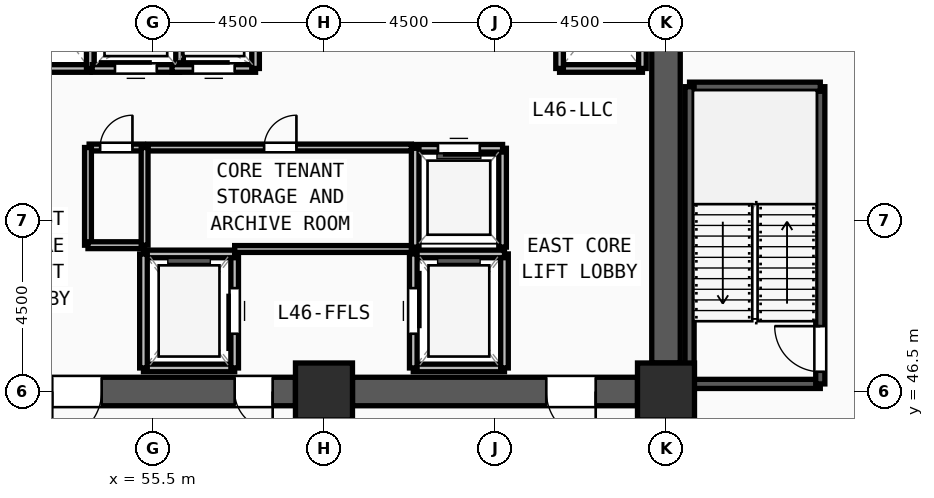
"""IFC4 building model, lengths in metres.
Left out: names, types, materials, properties, quantities, classifications, styles, units other than length and angle.
Written with IfcOpenShell. Run it as: python <this file> out.ifc"""

import sys

from ifc_helpers import new_model, si_unit, direction, frame, frame_2d, origin, origin_2d, place, context, subcontext, project, spatial, rectangle, extrude, source, transform, mapped, element, fill, save


model = new_model("IFC4")
c1 = context("Model", 3, precision=1e-05, world=origin(), true_north=direction((0.0, 1.0)))
c2 = subcontext(c1, "Body", "Model", "MODEL_VIEW")
j1 = project(units=[si_unit("LENGTHUNIT", "METRE"), si_unit("PLANEANGLEUNIT", "RADIAN")], contexts=[c1])
p1 = place(None, origin())
s1 = spatial("IfcSite", under=j1, at=p1, CompositionType="ELEMENT")
p2 = place(p1, origin())
s2 = spatial("IfcBuilding", under=s1, at=p2, CompositionType="ELEMENT")
p3 = place(p2, frame((0.0, 0.0, 177.75)))
s3 = spatial("IfcBuildingStorey", under=s2, at=p3, CompositionType="ELEMENT", Elevation=177.75)
m1 = source(origin(), c2, "Body", "SweptSolid", [
    extrude(rectangle(XDim=1.5, YDim=1.5, at=origin_2d()), origin(), (0.0, 0.0, 1.0), 3.75),
])
for number, where, z_axis, x_axis in (
    (1, (60.0, 46.5, 0.0), (0.0, 0.0, 1.0), (1.0, 0.0, 0.0)),
    (2, (69.0, 46.5, 0.0), (0.0, 0.0, 1.0), (1.0, 0.0, 0.0)),
):
    element("IfcColumn", number, at=place(p3, frame(where, z_axis=z_axis, x_axis=x_axis)), inside=s3, PredefinedType="COLUMN", context=c2, shape_type="MappedRepresentation", body=[
        mapped(m1, transform((0.0, 0.0, 0.0), x_axis=(1.0, 0.0, 0.0), y_axis=(0.0, 1.0, 0.0), z_axis=(0.0, 0.0, 1.0), scale=1.0)),
    ])
p4 = place(p3, frame((69.0, 60.75, 0.0), z_axis=(0.0, 0.0, 1.0), x_axis=(0.0, -1.0, 0.0)))
e3 = element("IfcWall", 3, at=p4, inside=s3, PredefinedType="SHEAR", context=c2, shape_type="SweptSolid", body=[
    extrude(rectangle(XDim=13.5, YDim=0.75, at=frame_2d((6.75, 0.0))), origin(), (0.0, 0.0, 1.0), 3.57),
])
m2 = source(origin(), c2, "Body", "SweptSolid", [
    extrude(rectangle(XDim=1.2, YDim=2.2, at=frame_2d((0.6, 1.1))), frame((0.0, 0.385, 0.0), z_axis=(0.0, -1.0, 0.0), x_axis=(1.0, 0.0, 0.0)), (0.0, 0.0, 1.0), 0.77),
])
p5 = place(p4, frame((1.2, 0.0, 0.0)))
e4 = element("IfcOpeningElement", 4, at=p5, cuts=e3, PredefinedType="OPENING", context=c2, shape_type="MappedRepresentation", body=[
    mapped(m2, transform((0.0, 0.0, 0.0), x_axis=(1.0, 0.0, 0.0), y_axis=(0.0, 1.0, 0.0), z_axis=(0.0, 0.0, 1.0), scale=1.0)),
])
p6 = place(p3, frame((68.25, 46.5, 0.0), z_axis=(0.0, 0.0, 1.0), x_axis=(-1.0, 0.0, 0.0)))
e5 = element("IfcWall", 5, at=p6, inside=s3, PredefinedType="SHEAR", context=c2, shape_type="SweptSolid", body=[
    extrude(rectangle(XDim=7.5, YDim=0.75, at=frame_2d((3.75, 0.0))), origin(), (0.0, 0.0, 1.0), 3.57),
])
m3 = source(origin(), c2, "Body", "SweptSolid", [
    extrude(rectangle(XDim=1.3, YDim=2.2, at=frame_2d((0.65, 1.1))), frame((0.0, 0.385, 0.0), z_axis=(0.0, -1.0, 0.0), x_axis=(1.0, 0.0, 0.0)), (0.0, 0.0, 1.0), 0.77),
])
p7 = place(p6, frame((1.1, 0.0, 0.0)))
e6 = element("IfcOpeningElement", 6, at=p7, cuts=e5, PredefinedType="OPENING", context=c2, shape_type="MappedRepresentation", body=[
    mapped(m3, transform((0.0, 0.0, 0.0), x_axis=(1.0, 0.0, 0.0), y_axis=(0.0, 1.0, 0.0), z_axis=(0.0, 0.0, 1.0), scale=1.0)),
])
p8 = place(p3, frame((59.25, 46.5, 0.0), z_axis=(0.0, 0.0, 1.0), x_axis=(-1.0, 0.0, 0.0)))
e7 = element("IfcWall", 7, at=p8, inside=s3, PredefinedType="SHEAR", context=c2, shape_type="SweptSolid", body=[
    extrude(rectangle(XDim=7.5, YDim=0.75, at=frame_2d((3.75, 0.0))), origin(), (0.0, 0.0, 1.0), 3.57),
])
p9 = place(p8, frame((5.1, 0.0, 0.0)))
e8 = element("IfcOpeningElement", 8, at=p9, cuts=e7, PredefinedType="OPENING", context=c2, shape_type="MappedRepresentation", body=[
    mapped(m3, transform((0.0, 0.0, 0.0), x_axis=(1.0, 0.0, 0.0), y_axis=(0.0, 1.0, 0.0), z_axis=(0.0, 0.0, 1.0), scale=1.0)),
])
m4 = source(origin(), c2, "Body", "SweptSolid", [
    extrude(rectangle(XDim=1.0, YDim=2.2, at=frame_2d((0.5, 1.1))), frame((0.0, 0.385, 0.0), z_axis=(0.0, -1.0, 0.0), x_axis=(1.0, 0.0, 0.0)), (0.0, 0.0, 1.0), 0.77),
])
p10 = place(p8, frame((0.6, 0.0, 0.0)))
e9 = element("IfcOpeningElement", 9, at=p10, cuts=e7, PredefinedType="OPENING", context=c2, shape_type="MappedRepresentation", body=[
    mapped(m4, transform((0.0, 0.0, 0.0), x_axis=(1.0, 0.0, 0.0), y_axis=(0.0, 1.0, 0.0), z_axis=(0.0, 0.0, 1.0), scale=1.0)),
])
p11 = place(p3, frame((69.62, 46.7, 0.0), z_axis=(0.0, 0.0, 1.0), x_axis=(1.0, 0.0, 0.0)))
e10 = element("IfcWall", 10, at=p11, inside=s3, PredefinedType="SOLIDWALL", context=c2, shape_type="SweptSolid", body=[
    extrude(rectangle(XDim=3.44, YDim=0.24, at=frame_2d((1.72, 0.0))), origin(), (0.0, 0.0, 1.0), 3.57),
])
p12 = place(p3, frame((73.06, 46.7, 0.0), z_axis=(0.0, 0.0, 1.0), x_axis=(0.0, 1.0, 0.0)))
e11 = element("IfcWall", 11, at=p12, inside=s3, PredefinedType="SOLIDWALL", context=c2, shape_type="SweptSolid", body=[
    extrude(rectangle(XDim=7.82, YDim=0.24, at=frame_2d((3.91, 0.0))), origin(), (0.0, 0.0, 1.0), 3.57),
])
m5 = source(origin(), c2, "Body", "SweptSolid", [
    extrude(rectangle(XDim=1.2, YDim=2.2, at=frame_2d((0.6, 1.1))), frame((0.0, 0.13, 0.0), z_axis=(0.0, -1.0, 0.0), x_axis=(1.0, 0.0, 0.0)), (0.0, 0.0, 1.0), 0.26),
])
p13 = place(p12, frame((0.32, 0.0, 0.0)))
e12 = element("IfcOpeningElement", 12, at=p13, cuts=e11, PredefinedType="OPENING", context=c2, shape_type="MappedRepresentation", body=[
    mapped(m5, transform((0.0, 0.0, 0.0), x_axis=(1.0, 0.0, 0.0), y_axis=(0.0, 1.0, 0.0), z_axis=(0.0, 0.0, 1.0), scale=1.0)),
])
p14 = place(p3, frame((73.06, 54.52, 0.0), z_axis=(0.0, 0.0, 1.0), x_axis=(-1.0, 0.0, 0.0)))
e13 = element("IfcWall", 13, at=p14, inside=s3, PredefinedType="SOLIDWALL", context=c2, shape_type="SweptSolid", body=[
    extrude(rectangle(XDim=3.44, YDim=0.24, at=frame_2d((1.72, 0.0))), origin(), (0.0, 0.0, 1.0), 3.57),
])
p15 = place(p3, frame((69.62, 54.52, 0.0), z_axis=(0.0, 0.0, 1.0), x_axis=(0.0, -1.0, 0.0)))
e14 = element("IfcWall", 14, at=p15, inside=s3, PredefinedType="SOLIDWALL", context=c2, shape_type="SweptSolid", body=[
    extrude(rectangle(XDim=7.82, YDim=0.24, at=frame_2d((3.91, 0.0))), origin(), (0.0, 0.0, 1.0), 3.57),
])
p16 = place(p3, frame((55.25, 47.12, 0.0), z_axis=(0.0, 0.0, 1.0), x_axis=(1.0, 0.0, 0.0)))
e15 = element("IfcWall", 15, at=p16, inside=s3, PredefinedType="SOLIDWALL", context=c2, shape_type="SweptSolid", body=[
    extrude(rectangle(XDim=2.4, YDim=0.2, at=frame_2d((1.2, 0.0))), origin(), (0.0, 0.0, 1.0), 3.57),
])
p17 = place(p3, frame((57.65, 47.12, 0.0), z_axis=(0.0, 0.0, 1.0), x_axis=(0.0, 1.0, 0.0)))
e16 = element("IfcWall", 16, at=p17, inside=s3, PredefinedType="SOLIDWALL", context=c2, shape_type="SweptSolid", body=[
    extrude(rectangle(XDim=3.0, YDim=0.2, at=frame_2d((1.5, 0.0))), origin(), (0.0, 0.0, 1.0), 3.57),
])
m6 = source(origin(), c2, "Body", "SweptSolid", [
    extrude(rectangle(XDim=1.2, YDim=2.3, at=frame_2d((0.6, 1.15))), frame((0.0, 0.11, 0.0), z_axis=(0.0, -1.0, 0.0), x_axis=(1.0, 0.0, 0.0)), (0.0, 0.0, 1.0), 0.22),
])
p18 = place(p17, frame((0.9, 0.0, 0.0)))
e17 = element("IfcOpeningElement", 17, at=p18, cuts=e16, PredefinedType="OPENING", context=c2, shape_type="MappedRepresentation", body=[
    mapped(m6, transform((0.0, 0.0, 0.0), x_axis=(1.0, 0.0, 0.0), y_axis=(0.0, 1.0, 0.0), z_axis=(0.0, 0.0, 1.0), scale=1.0)),
])
p19 = place(p3, frame((57.65, 50.12, 0.0), z_axis=(0.0, 0.0, 1.0), x_axis=(-1.0, 0.0, 0.0)))
e18 = element("IfcWall", 18, at=p19, inside=s3, PredefinedType="SOLIDWALL", context=c2, shape_type="SweptSolid", body=[
    extrude(rectangle(XDim=2.4, YDim=0.2, at=frame_2d((1.2, 0.0))), origin(), (0.0, 0.0, 1.0), 3.57),
])
p20 = place(p3, frame((55.25, 50.12, 0.0), z_axis=(0.0, 0.0, 1.0), x_axis=(0.0, -1.0, 0.0)))
e19 = element("IfcWall", 19, at=p20, inside=s3, PredefinedType="SOLIDWALL", context=c2, shape_type="SweptSolid", body=[
    extrude(rectangle(XDim=3.0, YDim=0.2, at=frame_2d((1.5, 0.0))), origin(), (0.0, 0.0, 1.0), 3.57),
])
p21 = place(p3, frame((62.35, 47.12, 0.0), z_axis=(0.0, 0.0, 1.0), x_axis=(1.0, 0.0, 0.0)))
e20 = element("IfcWall", 20, at=p21, inside=s3, PredefinedType="SOLIDWALL", context=c2, shape_type="SweptSolid", body=[
    extrude(rectangle(XDim=2.4, YDim=0.2, at=frame_2d((1.2, 0.0))), origin(), (0.0, 0.0, 1.0), 3.57),
])
p22 = place(p3, frame((64.75, 47.12, 0.0), z_axis=(0.0, 0.0, 1.0), x_axis=(0.0, 1.0, 0.0)))
e21 = element("IfcWall", 21, at=p22, inside=s3, PredefinedType="SOLIDWALL", context=c2, shape_type="SweptSolid", body=[
    extrude(rectangle(XDim=3.0, YDim=0.2, at=frame_2d((1.5, 0.0))), origin(), (0.0, 0.0, 1.0), 3.57),
])
p23 = place(p3, frame((64.75, 50.12, 0.0), z_axis=(0.0, 0.0, 1.0), x_axis=(-1.0, 0.0, 0.0)))
e22 = element("IfcWall", 22, at=p23, inside=s3, PredefinedType="SOLIDWALL", context=c2, shape_type="SweptSolid", body=[
    extrude(rectangle(XDim=2.4, YDim=0.2, at=frame_2d((1.2, 0.0))), origin(), (0.0, 0.0, 1.0), 3.57),
])
p24 = place(p3, frame((62.35, 50.12, 0.0), z_axis=(0.0, 0.0, 1.0), x_axis=(0.0, -1.0, 0.0)))
e23 = element("IfcWall", 23, at=p24, inside=s3, PredefinedType="SOLIDWALL", context=c2, shape_type="SweptSolid", body=[
    extrude(rectangle(XDim=3.0, YDim=0.2, at=frame_2d((1.5, 0.0))), origin(), (0.0, 0.0, 1.0), 3.57),
])
p25 = place(p24, frame((0.9, 0.0, 0.0)))
e24 = element("IfcOpeningElement", 24, at=p25, cuts=e23, PredefinedType="OPENING", context=c2, shape_type="MappedRepresentation", body=[
    mapped(m6, transform((0.0, 0.0, 0.0), x_axis=(1.0, 0.0, 0.0), y_axis=(0.0, 1.0, 0.0), z_axis=(0.0, 0.0, 1.0), scale=1.0)),
])
p26 = place(p3, frame((51.62, 55.0, 0.0), z_axis=(0.0, 0.0, 1.0), x_axis=(1.0, 0.0, 0.0)))
e25 = element("IfcWall", 25, at=p26, inside=s3, PredefinedType="SOLIDWALL", context=c2, shape_type="SweptSolid", body=[
    extrude(rectangle(XDim=2.23, YDim=0.2, at=frame_2d((1.115, 0.0))), origin(), (0.0, 0.0, 1.0), 3.57),
])
p27 = place(p3, frame((53.85, 55.0, 0.0), z_axis=(0.0, 0.0, 1.0), x_axis=(0.0, 1.0, 0.0)))
e26 = element("IfcWall", 26, at=p27, inside=s3, PredefinedType="SOLIDWALL", context=c2, shape_type="SweptSolid", body=[
    extrude(rectangle(XDim=3.0, YDim=0.2, at=frame_2d((1.5, 0.0))), origin(), (0.0, 0.0, 1.0), 3.57),
])
p28 = place(p3, frame((66.2, 55.0, 0.0), z_axis=(0.0, 0.0, 1.0), x_axis=(1.0, 0.0, 0.0)))
e27 = element("IfcWall", 27, at=p28, inside=s3, PredefinedType="SOLIDWALL", context=c2, shape_type="SweptSolid", body=[
    extrude(rectangle(XDim=2.18, YDim=0.2, at=frame_2d((1.09, 0.0))), origin(), (0.0, 0.0, 1.0), 3.57),
])
for number, where, z_axis, x_axis in (
    (28, (68.38, 55.0, 0.0), (0.0, 0.0, 1.0), (0.0, 1.0, 0.0)),
    (29, (66.2, 57.75, 0.0), (0.0, 0.0, 1.0), (0.0, -1.0, 0.0)),
):
    element("IfcWall", number, at=place(p3, frame(where, z_axis=z_axis, x_axis=x_axis)), inside=s3, PredefinedType="SOLIDWALL", context=c2, shape_type="SweptSolid", body=[
        extrude(rectangle(XDim=2.75, YDim=0.2, at=frame_2d((1.375, 0.0))), origin(), (0.0, 0.0, 1.0), 3.57),
    ])
p29 = place(p3, frame((64.7, 50.3, 0.0), z_axis=(0.0, 0.0, 1.0), x_axis=(0.0, 1.0, 0.0)))
e30 = element("IfcWall", 30, at=p29, inside=s3, PredefinedType="SOLIDWALL", context=c2, shape_type="SweptSolid", body=[
    extrude(rectangle(XDim=2.6, YDim=0.2, at=frame_2d((1.3, 0.0))), origin(), (0.0, 0.0, 1.0), 3.57),
])
p30 = place(p3, frame((64.7, 52.9, 0.0), z_axis=(0.0, 0.0, 1.0), x_axis=(-1.0, 0.0, 0.0)))
e31 = element("IfcWall", 31, at=p30, inside=s3, PredefinedType="SOLIDWALL", context=c2, shape_type="SweptSolid", body=[
    extrude(rectangle(XDim=2.3, YDim=0.2, at=frame_2d((1.15, 0.0))), origin(), (0.0, 0.0, 1.0), 3.57),
])
m7 = source(origin(), c2, "Body", "SweptSolid", [
    extrude(rectangle(XDim=1.1, YDim=2.2, at=frame_2d((0.55, 1.1))), frame((0.0, 0.11, 0.0), z_axis=(0.0, -1.0, 0.0), x_axis=(1.0, 0.0, 0.0)), (0.0, 0.0, 1.0), 0.22),
])
p31 = place(p30, frame((0.6, 0.0, 0.0)))
e32 = element("IfcOpeningElement", 32, at=p31, cuts=e31, PredefinedType="OPENING", context=c2, shape_type="MappedRepresentation", body=[
    mapped(m7, transform((0.0, 0.0, 0.0), x_axis=(1.0, 0.0, 0.0), y_axis=(0.0, 1.0, 0.0), z_axis=(0.0, 0.0, 1.0), scale=1.0)),
])
p32 = place(p3, frame((62.4, 52.9, 0.0), z_axis=(0.0, 0.0, 1.0), x_axis=(0.0, -1.0, 0.0)))
e33 = element("IfcWall", 33, at=p32, inside=s3, PredefinedType="SOLIDWALL", context=c2, shape_type="SweptSolid", body=[
    extrude(rectangle(XDim=2.6, YDim=0.2, at=frame_2d((1.3, 0.0))), origin(), (0.0, 0.0, 1.0), 3.57),
])
p33 = place(p3, frame((53.9, 55.0, 0.0), z_axis=(0.0, 0.0, 1.0), x_axis=(1.0, 0.0, 0.0)))
e34 = element("IfcWall", 34, at=p33, inside=s3, PredefinedType="SOLIDWALL", context=c2, shape_type="SweptSolid", body=[
    extrude(rectangle(XDim=2.3, YDim=0.2, at=frame_2d((1.15, 0.0))), origin(), (0.0, 0.0, 1.0), 3.57),
])
p34 = place(p33, frame((0.6, 0.0, 0.0)))
e35 = element("IfcOpeningElement", 35, at=p34, cuts=e34, PredefinedType="OPENING", context=c2, shape_type="MappedRepresentation", body=[
    mapped(m7, transform((0.0, 0.0, 0.0), x_axis=(1.0, 0.0, 0.0), y_axis=(0.0, 1.0, 0.0), z_axis=(0.0, 0.0, 1.0), scale=1.0)),
])
p35 = place(p3, frame((56.2, 55.0, 0.0), z_axis=(0.0, 0.0, 1.0), x_axis=(0.0, 1.0, 0.0)))
e36 = element("IfcWall", 36, at=p35, inside=s3, PredefinedType="SOLIDWALL", context=c2, shape_type="SweptSolid", body=[
    extrude(rectangle(XDim=2.6, YDim=0.2, at=frame_2d((1.3, 0.0))), origin(), (0.0, 0.0, 1.0), 3.57),
])
p36 = place(p3, frame((56.0, 55.0, 0.0), z_axis=(0.0, 0.0, 1.0), x_axis=(1.0, 0.0, 0.0)))
e37 = element("IfcWall", 37, at=p36, inside=s3, PredefinedType="SOLIDWALL", context=c2, shape_type="SweptSolid", body=[
    extrude(rectangle(XDim=2.2, YDim=0.2, at=frame_2d((1.1, 0.0))), origin(), (0.0, 0.0, 1.0), 3.57),
])
p37 = place(p36, frame((0.55, 0.0, 0.0)))
e38 = element("IfcOpeningElement", 38, at=p37, cuts=e37, PredefinedType="OPENING", context=c2, shape_type="MappedRepresentation", body=[
    mapped(m7, transform((0.0, 0.0, 0.0), x_axis=(1.0, 0.0, 0.0), y_axis=(0.0, 1.0, 0.0), z_axis=(0.0, 0.0, 1.0), scale=1.0)),
])
p38 = place(p3, frame((58.2, 55.0, 0.0), z_axis=(0.0, 0.0, 1.0), x_axis=(0.0, 1.0, 0.0)))
e39 = element("IfcWall", 39, at=p38, inside=s3, PredefinedType="SOLIDWALL", context=c2, shape_type="SweptSolid", body=[
    extrude(rectangle(XDim=2.6, YDim=0.2, at=frame_2d((1.3, 0.0))), origin(), (0.0, 0.0, 1.0), 3.57),
])
p39 = place(p3, frame((55.37, 52.92, 0.0), z_axis=(0.0, 0.0, 1.0), x_axis=(1.0, 0.0, 0.0)))
e40 = element("IfcWall", 40, at=p39, inside=s3, PredefinedType="PARTITIONING", context=c2, shape_type="SweptSolid", body=[
    extrude(rectangle(XDim=6.93, YDim=0.18, at=frame_2d((3.465, 0.0))), origin(), (0.0, 0.0, 1.0), 3.57),
])
m8 = source(origin(), c2, "Body", "SweptSolid", [
    extrude(rectangle(XDim=0.85, YDim=2.1, at=frame_2d((0.425, 1.05))), frame((0.0, 0.1, 0.0), z_axis=(0.0, -1.0, 0.0), x_axis=(1.0, 0.0, 0.0)), (0.0, 0.0, 1.0), 0.2),
])
p40 = place(p39, frame((3.055, 0.0, 0.0)))
e41 = element("IfcOpeningElement", 41, at=p40, cuts=e40, PredefinedType="OPENING", context=c2, shape_type="MappedRepresentation", body=[
    mapped(m8, transform((0.0, 0.0, 0.0), x_axis=(1.0, 0.0, 0.0), y_axis=(0.0, 1.0, 0.0), z_axis=(0.0, 0.0, 1.0), scale=1.0)),
])
p41 = place(p3, frame((53.82, 52.92, 0.0), z_axis=(0.0, 0.0, 1.0), x_axis=(1.0, 0.0, 0.0)))
e42 = element("IfcWall", 42, at=p41, inside=s3, PredefinedType="PARTITIONING", context=c2, shape_type="SweptSolid", body=[
    extrude(rectangle(XDim=1.43, YDim=0.18, at=frame_2d((0.715, 0.0))), origin(), (0.0, 0.0, 1.0), 3.57),
])
p42 = place(p41, frame((0.29, 0.0, 0.0)))
e43 = element("IfcOpeningElement", 43, at=p42, cuts=e42, PredefinedType="OPENING", context=c2, shape_type="MappedRepresentation", body=[
    mapped(m8, transform((0.0, 0.0, 0.0), x_axis=(1.0, 0.0, 0.0), y_axis=(0.0, 1.0, 0.0), z_axis=(0.0, 0.0, 1.0), scale=1.0)),
])
p43 = place(p3, frame((53.79, 50.35, 0.0), z_axis=(0.0, 0.0, 1.0), x_axis=(0.0, 1.0, 0.0)))
e44 = element("IfcWall", 44, at=p43, inside=s3, PredefinedType="PARTITIONING", context=c2, shape_type="SweptSolid", body=[
    extrude(rectangle(XDim=2.57, YDim=0.18, at=frame_2d((1.285, 0.0))), origin(), (0.0, 0.0, 1.0), 3.57),
])
p44 = place(p3, frame((53.79, 50.35, 0.0), z_axis=(0.0, 0.0, 1.0), x_axis=(1.0, 0.0, 0.0)))
e45 = element("IfcWall", 45, at=p44, inside=s3, PredefinedType="PARTITIONING", context=c2, shape_type="SweptSolid", body=[
    extrude(rectangle(XDim=1.49, YDim=0.18, at=frame_2d((0.745, 0.0))), origin(), (0.0, 0.0, 1.0), 3.57),
])
p45 = place(p3, frame((55.28, 50.35, 0.0), z_axis=(0.0, 0.0, 1.0), x_axis=(0.0, 1.0, 0.0)))
e46 = element("IfcWall", 46, at=p45, inside=s3, PredefinedType="PARTITIONING", context=c2, shape_type="SweptSolid", body=[
    extrude(rectangle(XDim=2.57, YDim=0.18, at=frame_2d((1.285, 0.0))), origin(), (0.0, 0.0, 1.0), 3.57),
])
p46 = place(p3, frame((57.65, 50.25, 0.0), z_axis=(0.0, 0.0, 1.0), x_axis=(1.0, 0.0, 0.0)))
e47 = element("IfcWall", 47, at=p46, inside=s3, PredefinedType="PARTITIONING", context=c2, shape_type="SweptSolid", body=[
    extrude(rectangle(XDim=4.65, YDim=0.18, at=frame_2d((2.325, 0.0))), origin(), (0.0, 0.0, 1.0), 3.57),
])
m9 = source(origin(), c2, "Body", "SweptSolid", [
    extrude(rectangle(XDim=1.3, YDim=2.2, at=frame_2d((0.65, 1.1))), frame((0.0, 0.025, 0.0), z_axis=(0.0, -1.0, 0.0), x_axis=(1.0, 0.0, 0.0)), (0.0, 0.0, 1.0), 0.05),
])
p47 = place(p9, origin())
e48 = element("IfcDoor", 48, at=p47, inside=s3, OperationType="SINGLE_SWING_RIGHT", PredefinedType="DOOR", context=c2, shape_type="MappedRepresentation", body=[
    mapped(m9, transform((0.0, 0.0, 0.0), x_axis=(1.0, 0.0, 0.0), y_axis=(0.0, 1.0, 0.0), z_axis=(0.0, 0.0, 1.0), scale=1.0)),
])
fill(e8, e48)
m10 = source(origin(), c2, "Body", "SweptSolid", [
    extrude(rectangle(XDim=1.0, YDim=2.2, at=frame_2d((0.5, 1.1))), frame((0.0, 0.025, 0.0), z_axis=(0.0, -1.0, 0.0), x_axis=(1.0, 0.0, 0.0)), (0.0, 0.0, 1.0), 0.05),
])
p48 = place(p10, origin())
e49 = element("IfcDoor", 49, at=p48, inside=s3, OperationType="SINGLE_SWING_LEFT", PredefinedType="DOOR", context=c2, shape_type="MappedRepresentation", body=[
    mapped(m10, transform((0.0, 0.0, 0.0), x_axis=(1.0, 0.0, 0.0), y_axis=(0.0, 1.0, 0.0), z_axis=(0.0, 0.0, 1.0), scale=1.0)),
])
fill(e9, e49)
p49 = place(p7, origin())
e50 = element("IfcDoor", 50, at=p49, inside=s3, OperationType="SINGLE_SWING_LEFT", PredefinedType="DOOR", context=c2, shape_type="MappedRepresentation", body=[
    mapped(m9, transform((0.0, 0.0, 0.0), x_axis=(1.0, 0.0, 0.0), y_axis=(0.0, 1.0, 0.0), z_axis=(0.0, 0.0, 1.0), scale=1.0)),
])
fill(e6, e50)
m11 = source(origin(), c2, "Body", "SweptSolid", [
    extrude(rectangle(XDim=1.2, YDim=2.2, at=frame_2d((0.6, 1.1))), frame((0.0, 0.025, 0.0), z_axis=(0.0, -1.0, 0.0), x_axis=(1.0, 0.0, 0.0)), (0.0, 0.0, 1.0), 0.05),
])
p50 = place(p13, origin())
e51 = element("IfcDoor", 51, at=p50, inside=s3, OperationType="SINGLE_SWING_RIGHT", PredefinedType="DOOR", context=c2, shape_type="MappedRepresentation", body=[
    mapped(m11, transform((0.0, 0.0, 0.0), x_axis=(1.0, 0.0, 0.0), y_axis=(0.0, 1.0, 0.0), z_axis=(0.0, 0.0, 1.0), scale=1.0)),
])
fill(e12, e51)
m12 = source(origin(), c2, "Body", "SweptSolid", [
    extrude(rectangle(XDim=1.2, YDim=2.3, at=frame_2d((0.6, 1.15))), frame((0.0, 0.025, 0.0), z_axis=(0.0, -1.0, 0.0), x_axis=(1.0, 0.0, 0.0)), (0.0, 0.0, 1.0), 0.05),
])
p51 = place(p18, origin())
e52 = element("IfcDoor", 52, at=p51, inside=s3, OperationType="SLIDING_TO_LEFT", PredefinedType="DOOR", context=c2, shape_type="MappedRepresentation", body=[
    mapped(m12, transform((0.0, 0.0, 0.0), x_axis=(1.0, 0.0, 0.0), y_axis=(0.0, 1.0, 0.0), z_axis=(0.0, 0.0, 1.0), scale=1.0)),
])
fill(e17, e52)
p52 = place(p25, origin())
e53 = element("IfcDoor", 53, at=p52, inside=s3, OperationType="SLIDING_TO_LEFT", PredefinedType="DOOR", context=c2, shape_type="MappedRepresentation", body=[
    mapped(m12, transform((0.0, 0.0, 0.0), x_axis=(1.0, 0.0, 0.0), y_axis=(0.0, 1.0, 0.0), z_axis=(0.0, 0.0, 1.0), scale=1.0)),
])
fill(e24, e53)
m13 = source(origin(), c2, "Body", "SweptSolid", [
    extrude(rectangle(XDim=1.1, YDim=2.2, at=frame_2d((0.55, 1.1))), frame((0.0, 0.025, 0.0), z_axis=(0.0, -1.0, 0.0), x_axis=(1.0, 0.0, 0.0)), (0.0, 0.0, 1.0), 0.05),
])
p53 = place(p31, origin())
e54 = element("IfcDoor", 54, at=p53, inside=s3, OperationType="SLIDING_TO_LEFT", PredefinedType="DOOR", context=c2, shape_type="MappedRepresentation", body=[
    mapped(m13, transform((0.0, 0.0, 0.0), x_axis=(1.0, 0.0, 0.0), y_axis=(0.0, 1.0, 0.0), z_axis=(0.0, 0.0, 1.0), scale=1.0)),
])
fill(e32, e54)
p54 = place(p34, origin())
e55 = element("IfcDoor", 55, at=p54, inside=s3, OperationType="SLIDING_TO_LEFT", PredefinedType="DOOR", context=c2, shape_type="MappedRepresentation", body=[
    mapped(m13, transform((0.0, 0.0, 0.0), x_axis=(1.0, 0.0, 0.0), y_axis=(0.0, 1.0, 0.0), z_axis=(0.0, 0.0, 1.0), scale=1.0)),
])
fill(e35, e55)
p55 = place(p37, origin())
e56 = element("IfcDoor", 56, at=p55, inside=s3, OperationType="SLIDING_TO_LEFT", PredefinedType="DOOR", context=c2, shape_type="MappedRepresentation", body=[
    mapped(m13, transform((0.0, 0.0, 0.0), x_axis=(1.0, 0.0, 0.0), y_axis=(0.0, 1.0, 0.0), z_axis=(0.0, 0.0, 1.0), scale=1.0)),
])
fill(e38, e56)
m14 = source(origin(), c2, "Body", "SweptSolid", [
    extrude(rectangle(XDim=0.85, YDim=2.1, at=frame_2d((0.425, 1.05))), frame((0.0, 0.025, 0.0), z_axis=(0.0, -1.0, 0.0), x_axis=(1.0, 0.0, 0.0)), (0.0, 0.0, 1.0), 0.05),
])
p56 = place(p40, origin())
e57 = element("IfcDoor", 57, at=p56, inside=s3, OperationType="SINGLE_SWING_RIGHT", PredefinedType="DOOR", context=c2, shape_type="MappedRepresentation", body=[
    mapped(m14, transform((0.0, 0.0, 0.0), x_axis=(1.0, 0.0, 0.0), y_axis=(0.0, 1.0, 0.0), z_axis=(0.0, 0.0, 1.0), scale=1.0)),
])
fill(e41, e57)
p57 = place(p42, origin())
e58 = element("IfcDoor", 58, at=p57, inside=s3, OperationType="SINGLE_SWING_RIGHT", PredefinedType="DOOR", context=c2, shape_type="MappedRepresentation", body=[
    mapped(m14, transform((0.0, 0.0, 0.0), x_axis=(1.0, 0.0, 0.0), y_axis=(0.0, 1.0, 0.0), z_axis=(0.0, 0.0, 1.0), scale=1.0)),
])
fill(e43, e58)
save(model, sys.argv[1])
